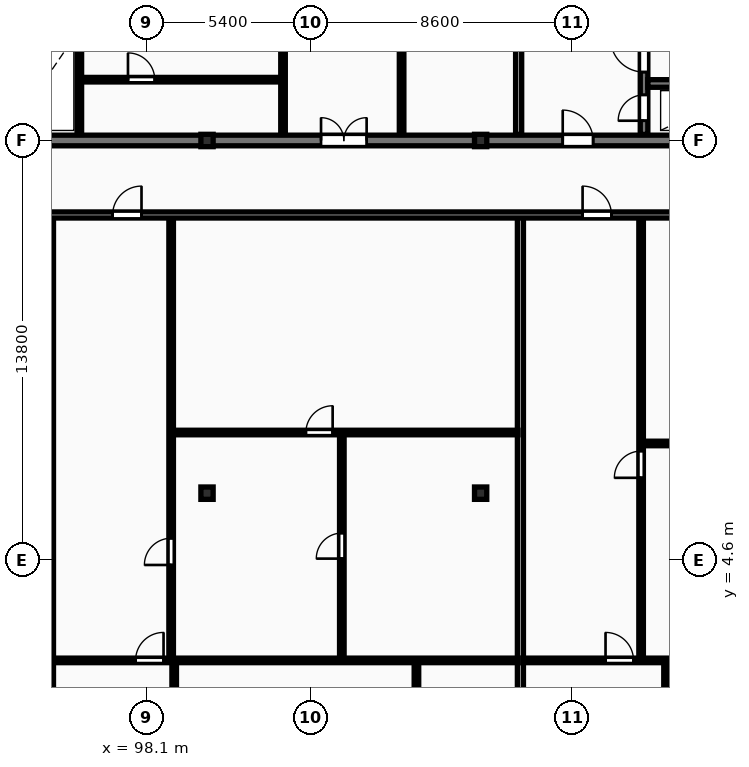
"""IFC4 building model, lengths in metres.
Left out: names, types, materials, properties, quantities, classifications, styles, units other than length and angle.
Written with IfcOpenShell. Run it as: python <this file> out.ifc"""

import sys

from ifc_helpers import new_model, si_unit, direction, frame, frame_2d, origin, origin_2d, place, context, subcontext, project, spatial, rectangle, i_section, extrude, element, fill, save


model = new_model("IFC4")
c1 = context("Model", 3, precision=1e-05, world=origin(), true_north=direction((0.0, 1.0)))
c2 = subcontext(c1, "Body", "Model", "MODEL_VIEW")
j1 = project(units=[si_unit("LENGTHUNIT", "METRE"), si_unit("PLANEANGLEUNIT", "RADIAN")], contexts=[c1])
p1 = place(None, origin())
s1 = spatial("IfcSite", under=j1, at=p1, CompositionType="ELEMENT")
p2 = place(p1, origin())
s2 = spatial("IfcBuilding", under=s1, at=p2, CompositionType="ELEMENT")
p3 = place(p2, frame((0.0, 0.0, 139.3)))
s3 = spatial("IfcBuildingStorey", under=s2, at=p3, CompositionType="ELEMENT", Elevation=139.3)
for number, where, z_axis, x_axis in (
    (1, (100.1, 6.8, 0.0), (0.0, 0.0, 1.0), (1.0, 0.0, 0.0)),
    (2, (100.1, 18.4, 0.0), (0.0, 0.0, 1.0), (1.0, 0.0, 0.0)),
    (3, (109.1, 6.8, 0.0), (0.0, 0.0, 1.0), (1.0, 0.0, 0.0)),
    (4, (109.1, 18.4, 0.0), (0.0, 0.0, 1.0), (1.0, 0.0, 0.0)),
):
    element("IfcColumn", number, at=place(p3, frame(where, z_axis=z_axis, x_axis=x_axis)), inside=s3, PredefinedType="COLUMN", context=c2, shape_type="SweptSolid", body=[
        extrude(i_section(OverallWidth=0.403, OverallDepth=0.406, WebThickness=0.027, FlangeThickness=0.043, FilletRadius=0.015, at=origin_2d()), origin(), (0.0, 0.0, 1.0), 3.6),
    ])
p4 = place(p3, frame((81.925, 18.4, 0.0), z_axis=(0.0, 0.0, 1.0), x_axis=(1.0, 0.0, 0.0)))
e5 = element("IfcWall", 5, at=p4, inside=s3, PredefinedType="SHEAR", context=c2, shape_type="SweptSolid", body=[
    extrude(rectangle(XDim=36.265, YDim=0.35, at=frame_2d((18.132, 0.0))), origin(), (0.0, 0.0, 1.0), 3.6),
])
p5 = place(p4, frame((5.675, 0.0, 0.0)))
e6 = element("IfcOpeningElement", 6, at=p5, cuts=e5, PredefinedType="OPENING", context=c2, shape_type="SweptSolid", body=[
    extrude(rectangle(XDim=1.0, YDim=2.15, at=frame_2d((0.5, 1.075))), frame((0.0, 0.185, 0.0), z_axis=(0.0, -1.0, 0.0), x_axis=(1.0, 0.0, 0.0)), (0.0, 0.0, 1.0), 0.37),
])
p6 = place(p4, frame((21.925, 0.0, 0.0)))
e7 = element("IfcOpeningElement", 7, at=p6, cuts=e5, PredefinedType="OPENING", context=c2, shape_type="SweptSolid", body=[
    extrude(rectangle(XDim=1.5, YDim=2.2, at=frame_2d((0.75, 1.1))), frame((0.0, 0.185, 0.0), z_axis=(0.0, -1.0, 0.0), x_axis=(1.0, 0.0, 0.0)), (0.0, 0.0, 1.0), 0.37),
])
p7 = place(p4, frame((29.875, 0.0, 0.0)))
e8 = element("IfcOpeningElement", 8, at=p7, cuts=e5, PredefinedType="OPENING", context=c2, shape_type="SweptSolid", body=[
    extrude(rectangle(XDim=1.0, YDim=2.15, at=frame_2d((0.5, 1.075))), frame((0.0, 0.185, 0.0), z_axis=(0.0, -1.0, 0.0), x_axis=(1.0, 0.0, 0.0)), (0.0, 0.0, 1.0), 0.37),
])
p8 = place(p3, frame((95.9, 18.6, 0.0), z_axis=(0.0, 0.0, 1.0), x_axis=(0.0, 1.0, 0.0)))
e9 = element("IfcWall", 9, at=p8, inside=s3, PredefinedType="PARTITIONING", context=c2, shape_type="SweptSolid", body=[
    extrude(rectangle(XDim=3.6, YDim=0.15, at=frame_2d((1.8, 0.0))), origin(), (0.0, 0.0, 1.0), 3.31),
])
p9 = place(p3, frame((95.9, 20.4, 0.0), z_axis=(0.0, 0.0, 1.0), x_axis=(1.0, 0.0, 0.0)))
e10 = element("IfcWall", 10, at=p9, inside=s3, PredefinedType="PARTITIONING", context=c2, shape_type="SweptSolid", body=[
    extrude(rectangle(XDim=6.7, YDim=0.15, at=frame_2d((3.35, 0.0))), origin(), (0.0, 0.0, 1.0), 3.31),
])
p10 = place(p9, frame((1.6, 0.0, 0.0)))
e11 = element("IfcOpeningElement", 11, at=p10, cuts=e10, PredefinedType="OPENING", context=c2, shape_type="SweptSolid", body=[
    extrude(rectangle(XDim=0.88, YDim=2.06, at=frame_2d((0.44, 1.03))), frame((0.0, 0.085, 0.0), z_axis=(0.0, -1.0, 0.0), x_axis=(1.0, 0.0, 0.0)), (0.0, 0.0, 1.0), 0.17),
])
for number, where, z_axis, x_axis in (
    (12, (102.6, 18.6, 0.0), (0.0, 0.0, 1.0), (0.0, 1.0, 0.0)),
    (13, (106.5, 18.6, 0.0), (0.0, 0.0, 1.0), (0.0, 1.0, 0.0)),
):
    element("IfcWall", number, at=place(p3, frame(where, z_axis=z_axis, x_axis=x_axis)), inside=s3, PredefinedType="PARTITIONING", context=c2, shape_type="SweptSolid", body=[
        extrude(rectangle(XDim=3.6, YDim=0.15, at=frame_2d((1.8, 0.0))), origin(), (0.0, 0.0, 1.0), 3.31),
    ])
p11 = place(p3, frame((110.35, 18.6, 0.0), z_axis=(0.0, 0.0, 1.0), x_axis=(0.0, 1.0, 0.0)))
e14 = element("IfcWall", 14, at=p11, inside=s3, PredefinedType="PARTITIONING", context=c2, shape_type="SweptSolid", body=[
    extrude(rectangle(XDim=11.6, YDim=0.2, at=frame_2d((5.8, 0.0))), origin(), (0.0, 0.0, 1.0), 3.31),
])
p12 = place(p11, frame((5.2, 0.0, 0.0)))
e15 = element("IfcOpeningElement", 15, at=p12, cuts=e14, PredefinedType="OPENING", context=c2, shape_type="SweptSolid", body=[
    extrude(rectangle(XDim=1.1, YDim=2.15, at=frame_2d((0.55, 1.075))), frame((0.0, 0.11, 0.0), z_axis=(0.0, -1.0, 0.0), x_axis=(1.0, 0.0, 0.0)), (0.0, 0.0, 1.0), 0.22),
])
p13 = place(p3, frame((114.475, 18.6, 0.0), z_axis=(0.0, 0.0, 1.0), x_axis=(0.0, 1.0, 0.0)))
e16 = element("IfcWall", 16, at=p13, inside=s3, PredefinedType="SHEAR", context=c2, shape_type="SweptSolid", body=[
    extrude(rectangle(XDim=11.6, YDim=0.25, at=frame_2d((5.8, 0.0))), origin(), (0.0, 0.0, 1.0), 3.6),
])
p14 = place(p13, frame((0.45, 0.0, 0.0)))
e17 = element("IfcOpeningElement", 17, at=p14, cuts=e16, PredefinedType="OPENING", context=c2, shape_type="SweptSolid", body=[
    extrude(rectangle(XDim=0.85, YDim=2.05, at=frame_2d((0.425, 1.025))), frame((0.0, 0.135, 0.0), z_axis=(0.0, -1.0, 0.0), x_axis=(1.0, 0.0, 0.0)), (0.0, 0.0, 1.0), 0.27),
])
p15 = place(p13, frame((2.05, 0.0, 0.0)))
e18 = element("IfcOpeningElement", 18, at=p15, cuts=e16, PredefinedType="OPENING", context=c2, shape_type="SweptSolid", body=[
    extrude(rectangle(XDim=1.1, YDim=2.1, at=frame_2d((0.55, 1.05))), frame((0.0, 0.135, 0.0), z_axis=(0.0, -1.0, 0.0), x_axis=(1.0, 0.0, 0.0)), (0.0, 0.0, 1.0), 0.27),
])
p16 = place(p13, frame((9.95, 0.0, 0.0)))
e19 = element("IfcOpeningElement", 19, at=p16, cuts=e16, PredefinedType="OPENING", context=c2, shape_type="SweptSolid", body=[
    extrude(rectangle(XDim=0.85, YDim=2.05, at=frame_2d((0.425, 1.025))), frame((0.0, 0.135, 0.0), z_axis=(0.0, -1.0, 0.0), x_axis=(1.0, 0.0, 0.0)), (0.0, 0.0, 1.0), 0.27),
])
p17 = place(p3, frame((114.6, 20.275, 0.0), z_axis=(0.0, 0.0, 1.0), x_axis=(1.0, 0.0, 0.0)))
e20 = element("IfcWall", 20, at=p17, inside=s3, PredefinedType="SHEAR", context=c2, shape_type="SweptSolid", body=[
    extrude(rectangle(XDim=3.24, YDim=0.25, at=frame_2d((1.62, 0.0))), origin(), (0.0, 0.0, 1.0), 3.6),
])
for number, where, z_axis, x_axis in (
    (21, (94.95, -8.7, 0.0), (0.0, 0.0, 1.0), (0.0, 1.0, 0.0)),
    (22, (110.408, -8.7, 0.0), (0.0, 0.0, 1.0), (0.0, 1.0, 0.0)),
):
    element("IfcWall", number, at=place(p3, frame(where, z_axis=z_axis, x_axis=x_axis)), inside=s3, PredefinedType="PARTITIONING", context=c2, shape_type="SweptSolid", body=[
        extrude(rectangle(XDim=24.57, YDim=0.2, at=frame_2d((12.285, 0.0))), origin(), (0.0, 0.0, 1.0), 3.31),
    ])
p18 = place(p3, frame((104.534, 1.34, 0.0), z_axis=(0.0, 0.0, 1.0), x_axis=(0.0, 1.0, 0.0)))
e23 = element("IfcWall", 23, at=p18, inside=s3, PredefinedType="PARTITIONING", context=c2, shape_type="SweptSolid", body=[
    extrude(rectangle(XDim=7.455, YDim=0.15, at=frame_2d((3.728, 0.0))), origin(), (0.0, 0.0, 1.0), 3.31),
])
p19 = place(p18, frame((3.308, 0.0, 0.0)))
e24 = element("IfcOpeningElement", 24, at=p19, cuts=e23, PredefinedType="OPENING", context=c2, shape_type="SweptSolid", body=[
    extrude(rectangle(XDim=0.84, YDim=2.04, at=frame_2d((0.42, 1.02))), frame((0.0, 0.085, 0.0), z_axis=(0.0, -1.0, 0.0), x_axis=(1.0, 0.0, 0.0)), (0.0, 0.0, 1.0), 0.17),
])
p20 = place(p3, frame((98.98, 8.795, 0.0), z_axis=(0.0, 0.0, 1.0), x_axis=(1.0, 0.0, 0.0)))
e25 = element("IfcWall", 25, at=p20, inside=s3, PredefinedType="PARTITIONING", context=c2, shape_type="SweptSolid", body=[
    extrude(rectangle(XDim=11.348, YDim=0.15, at=frame_2d((5.674, 0.0))), origin(), (0.0, 0.0, 1.0), 3.31),
])
p21 = place(p20, frame((4.372, 0.0, 0.0)))
e26 = element("IfcOpeningElement", 26, at=p21, cuts=e25, PredefinedType="OPENING", context=c2, shape_type="SweptSolid", body=[
    extrude(rectangle(XDim=0.88, YDim=2.06, at=frame_2d((0.44, 1.03))), frame((0.0, 0.085, 0.0), z_axis=(0.0, -1.0, 0.0), x_axis=(1.0, 0.0, 0.0)), (0.0, 0.0, 1.0), 0.17),
])
p22 = place(p3, frame((98.92, 1.34, 0.0), z_axis=(0.0, 0.0, 1.0), x_axis=(0.0, 1.0, 0.0)))
e27 = element("IfcWall", 27, at=p22, inside=s3, PredefinedType="PARTITIONING", context=c2, shape_type="SweptSolid", body=[
    extrude(rectangle(XDim=14.55, YDim=0.15, at=frame_2d((7.275, 0.0))), origin(), (0.0, 0.0, 1.0), 3.31),
])
p23 = place(p22, frame((3.098, 0.0, 0.0)))
e28 = element("IfcOpeningElement", 28, at=p23, cuts=e27, PredefinedType="OPENING", context=c2, shape_type="SweptSolid", body=[
    extrude(rectangle(XDim=0.88, YDim=2.06, at=frame_2d((0.44, 1.03))), frame((0.0, 0.085, 0.0), z_axis=(0.0, -1.0, 0.0), x_axis=(1.0, 0.0, 0.0)), (0.0, 0.0, 1.0), 0.17),
])
p24 = place(p3, frame((99.02, -3.74, 0.0), z_axis=(0.0, 0.0, 1.0), x_axis=(0.0, 1.0, 0.0)))
e29 = element("IfcWall", 29, at=p24, inside=s3, PredefinedType="PARTITIONING", context=c2, shape_type="SweptSolid", body=[
    extrude(rectangle(XDim=5.0, YDim=0.15, at=frame_2d((2.5, 0.0))), origin(), (0.0, 0.0, 1.0), 3.31),
])
p25 = place(p24, frame((2.06, 0.0, 0.0)))
e30 = element("IfcOpeningElement", 30, at=p25, cuts=e29, PredefinedType="OPENING", context=c2, shape_type="SweptSolid", body=[
    extrude(rectangle(XDim=0.88, YDim=2.06, at=frame_2d((0.44, 1.03))), frame((0.0, 0.085, 0.0), z_axis=(0.0, -1.0, 0.0), x_axis=(1.0, 0.0, 0.0)), (0.0, 0.0, 1.0), 0.17),
])
p26 = place(p3, frame((106.988, -8.7, 0.0), z_axis=(0.0, 0.0, 1.0), x_axis=(0.0, 1.0, 0.0)))
e31 = element("IfcWall", 31, at=p26, inside=s3, PredefinedType="PARTITIONING", context=c2, shape_type="SweptSolid", body=[
    extrude(rectangle(XDim=9.96, YDim=0.15, at=frame_2d((4.98, 0.0))), origin(), (0.0, 0.0, 1.0), 3.31),
])
p27 = place(p26, frame((5.894, 0.0, 0.0)))
e32 = element("IfcOpeningElement", 32, at=p27, cuts=e31, PredefinedType="OPENING", context=c2, shape_type="SweptSolid", body=[
    extrude(rectangle(XDim=0.84, YDim=2.04, at=frame_2d((0.42, 1.02))), frame((0.0, 0.085, 0.0), z_axis=(0.0, -1.0, 0.0), x_axis=(1.0, 0.0, 0.0)), (0.0, 0.0, 1.0), 0.17),
])
p28 = place(p26, frame((7.69, 0.0, 0.0)))
e33 = element("IfcOpeningElement", 33, at=p28, cuts=e31, PredefinedType="OPENING", context=c2, shape_type="SweptSolid", body=[
    extrude(rectangle(XDim=0.84, YDim=2.04, at=frame_2d((0.42, 1.02))), frame((0.0, 0.085, 0.0), z_axis=(0.0, -1.0, 0.0), x_axis=(1.0, 0.0, 0.0)), (0.0, 0.0, 1.0), 0.17),
])
p29 = place(p26, frame((2.223, 0.0, 0.0)))
e34 = element("IfcOpeningElement", 34, at=p29, cuts=e31, PredefinedType="OPENING", context=c2, shape_type="SweptSolid", body=[
    extrude(rectangle(XDim=0.88, YDim=2.06, at=frame_2d((0.44, 1.03))), frame((0.0, 0.085, 0.0), z_axis=(0.0, -1.0, 0.0), x_axis=(1.0, 0.0, 0.0)), (0.0, 0.0, 1.0), 0.17),
])
p30 = place(p3, frame((95.03, 1.3, 0.0), z_axis=(0.0, 0.0, 1.0), x_axis=(1.0, 0.0, 0.0)))
e35 = element("IfcWall", 35, at=p30, inside=s3, PredefinedType="PARTITIONING", context=c2, shape_type="SweptSolid", body=[
    extrude(rectangle(XDim=15.298, YDim=0.15, at=frame_2d((7.649, 0.0))), origin(), (0.0, 0.0, 1.0), 3.31),
])
p31 = place(p30, frame((2.72, 0.0, 0.0)))
e36 = element("IfcOpeningElement", 36, at=p31, cuts=e35, PredefinedType="OPENING", context=c2, shape_type="SweptSolid", body=[
    extrude(rectangle(XDim=0.92, YDim=2.08, at=frame_2d((0.46, 1.04))), frame((0.0, 0.085, 0.0), z_axis=(0.0, -1.0, 0.0), x_axis=(1.0, 0.0, 0.0)), (0.0, 0.0, 1.0), 0.17),
])
p32 = place(p3, frame((114.438, 8.435, 0.0), z_axis=(0.0, 0.0, 1.0), x_axis=(1.0, 0.0, 0.0)))
e37 = element("IfcWall", 37, at=p32, inside=s3, PredefinedType="PARTITIONING", context=c2, shape_type="SweptSolid", body=[
    extrude(rectangle(XDim=16.182, YDim=0.15, at=frame_2d((8.091, 0.0))), origin(), (0.0, 0.0, 1.0), 3.31),
])
p33 = place(p32, frame((6.821, 0.0, 0.0)))
e38 = element("IfcOpeningElement", 38, at=p33, cuts=e37, PredefinedType="OPENING", context=c2, shape_type="SweptSolid", body=[
    extrude(rectangle(XDim=0.88, YDim=2.06, at=frame_2d((0.44, 1.03))), frame((0.0, 0.085, 0.0), z_axis=(0.0, -1.0, 0.0), x_axis=(1.0, 0.0, 0.0)), (0.0, 0.0, 1.0), 0.17),
])
p34 = place(p3, frame((114.378, 1.34, 0.0), z_axis=(0.0, 0.0, 1.0), x_axis=(0.0, 1.0, 0.0)))
e39 = element("IfcWall", 39, at=p34, inside=s3, PredefinedType="PARTITIONING", context=c2, shape_type="SweptSolid", body=[
    extrude(rectangle(XDim=14.55, YDim=0.15, at=frame_2d((7.275, 0.0))), origin(), (0.0, 0.0, 1.0), 3.31),
])
p35 = place(p34, frame((5.965, 0.0, 0.0)))
e40 = element("IfcOpeningElement", 40, at=p35, cuts=e39, PredefinedType="OPENING", context=c2, shape_type="SweptSolid", body=[
    extrude(rectangle(XDim=0.88, YDim=2.06, at=frame_2d((0.44, 1.03))), frame((0.0, 0.085, 0.0), z_axis=(0.0, -1.0, 0.0), x_axis=(1.0, 0.0, 0.0)), (0.0, 0.0, 1.0), 0.17),
])
p36 = place(p3, frame((115.198, -8.7, 0.0), z_axis=(0.0, 0.0, 1.0), x_axis=(0.0, 1.0, 0.0)))
e41 = element("IfcWall", 41, at=p36, inside=s3, PredefinedType="PARTITIONING", context=c2, shape_type="SweptSolid", body=[
    extrude(rectangle(XDim=9.96, YDim=0.15, at=frame_2d((4.98, 0.0))), origin(), (0.0, 0.0, 1.0), 3.31),
])
p37 = place(p36, frame((5.22, 0.0, 0.0)))
e42 = element("IfcOpeningElement", 42, at=p37, cuts=e41, PredefinedType="OPENING", context=c2, shape_type="SweptSolid", body=[
    extrude(rectangle(XDim=0.92, YDim=2.08, at=frame_2d((0.46, 1.04))), frame((0.0, 0.085, 0.0), z_axis=(0.0, -1.0, 0.0), x_axis=(1.0, 0.0, 0.0)), (0.0, 0.0, 1.0), 0.17),
])
p38 = place(p3, frame((110.488, 1.3, 0.0), z_axis=(0.0, 0.0, 1.0), x_axis=(1.0, 0.0, 0.0)))
e43 = element("IfcWall", 43, at=p38, inside=s3, PredefinedType="PARTITIONING", context=c2, shape_type="SweptSolid", body=[
    extrude(rectangle(XDim=20.132, YDim=0.15, at=frame_2d((10.066, 0.0))), origin(), (0.0, 0.0, 1.0), 3.31),
])
p39 = place(p38, frame((2.72, 0.0, 0.0)))
e44 = element("IfcOpeningElement", 44, at=p39, cuts=e43, PredefinedType="OPENING", context=c2, shape_type="SweptSolid", body=[
    extrude(rectangle(XDim=0.92, YDim=2.08, at=frame_2d((0.46, 1.04))), frame((0.0, 0.085, 0.0), z_axis=(0.0, -1.0, 0.0), x_axis=(1.0, 0.0, 0.0)), (0.0, 0.0, 1.0), 0.17),
])
p40 = place(p3, frame((72.7, 15.95, 0.0), z_axis=(0.0, 0.0, 1.0), x_axis=(1.0, 0.0, 0.0)))
e45 = element("IfcWall", 45, at=p40, inside=s3, PredefinedType="PARTITIONING", context=c2, shape_type="SweptSolid", body=[
    extrude(rectangle(XDim=58.0, YDim=0.2, at=frame_2d((29.0, 0.0))), origin(), (0.0, 0.0, 1.0), 3.31),
])
p41 = place(p40, frame((2.045, 0.0, 0.0)))
e46 = element("IfcOpeningElement", 46, at=p41, cuts=e45, PredefinedType="OPENING", context=c2, shape_type="SweptSolid", body=[
    extrude(rectangle(XDim=0.95, YDim=2.15, at=frame_2d((0.475, 1.075))), frame((0.0, 0.11, 0.0), z_axis=(0.0, -1.0, 0.0), x_axis=(1.0, 0.0, 0.0)), (0.0, 0.0, 1.0), 0.22),
])
p42 = place(p40, frame((24.295, 0.0, 0.0)))
e47 = element("IfcOpeningElement", 47, at=p42, cuts=e45, PredefinedType="OPENING", context=c2, shape_type="SweptSolid", body=[
    extrude(rectangle(XDim=0.95, YDim=2.15, at=frame_2d((0.475, 1.075))), frame((0.0, 0.11, 0.0), z_axis=(0.0, -1.0, 0.0), x_axis=(1.0, 0.0, 0.0)), (0.0, 0.0, 1.0), 0.22),
])
p43 = place(p40, frame((39.753, 0.0, 0.0)))
e48 = element("IfcOpeningElement", 48, at=p43, cuts=e45, PredefinedType="OPENING", context=c2, shape_type="SweptSolid", body=[
    extrude(rectangle(XDim=0.95, YDim=2.15, at=frame_2d((0.475, 1.075))), frame((0.0, 0.11, 0.0), z_axis=(0.0, -1.0, 0.0), x_axis=(1.0, 0.0, 0.0)), (0.0, 0.0, 1.0), 0.22),
])
p44 = place(p6, origin())
e49 = element("IfcDoor", 49, at=p44, inside=s3, OperationType="DOUBLE_DOOR_SINGLE_SWING", PredefinedType="DOOR", context=c2, shape_type="SweptSolid", body=[
    extrude(rectangle(XDim=1.5, YDim=2.2, at=frame_2d((0.75, 1.1))), frame((0.0, 0.025, 0.0), z_axis=(0.0, -1.0, 0.0), x_axis=(1.0, 0.0, 0.0)), (0.0, 0.0, 1.0), 0.05),
])
fill(e7, e49)
p45 = place(p7, origin())
e50 = element("IfcDoor", 50, at=p45, inside=s3, OperationType="SINGLE_SWING_LEFT", PredefinedType="DOOR", context=c2, shape_type="SweptSolid", body=[
    extrude(rectangle(XDim=1.0, YDim=2.15, at=frame_2d((0.5, 1.075))), frame((0.0, 0.025, 0.0), z_axis=(0.0, -1.0, 0.0), x_axis=(1.0, 0.0, 0.0)), (0.0, 0.0, 1.0), 0.05),
])
fill(e8, e50)
p46 = place(p10, origin())
e51 = element("IfcDoor", 51, at=p46, inside=s3, OperationType="SINGLE_SWING_LEFT", PredefinedType="DOOR", context=c2, shape_type="SweptSolid", body=[
    extrude(rectangle(XDim=0.88, YDim=2.06, at=frame_2d((0.44, 1.03))), frame((0.0, 0.025, 0.0), z_axis=(0.0, -1.0, 0.0), x_axis=(1.0, 0.0, 0.0)), (0.0, 0.0, 1.0), 0.05),
])
fill(e11, e51)
p47 = place(p14, origin())
e52 = element("IfcDoor", 52, at=p47, inside=s3, OperationType="SINGLE_SWING_LEFT", PredefinedType="DOOR", context=c2, shape_type="SweptSolid", body=[
    extrude(rectangle(XDim=0.85, YDim=2.05, at=frame_2d((0.425, 1.025))), frame((0.0, 0.025, 0.0), z_axis=(0.0, -1.0, 0.0), x_axis=(1.0, 0.0, 0.0)), (0.0, 0.0, 1.0), 0.05),
])
fill(e17, e52)
p48 = place(p15, origin())
e53 = element("IfcDoor", 53, at=p48, inside=s3, OperationType="SINGLE_SWING_RIGHT", PredefinedType="DOOR", context=c2, shape_type="SweptSolid", body=[
    extrude(rectangle(XDim=1.1, YDim=2.1, at=frame_2d((0.55, 1.05))), frame((0.0, 0.025, 0.0), z_axis=(0.0, -1.0, 0.0), x_axis=(1.0, 0.0, 0.0)), (0.0, 0.0, 1.0), 0.05),
])
fill(e18, e53)
p49 = place(p19, origin())
e54 = element("IfcDoor", 54, at=p49, inside=s3, OperationType="SINGLE_SWING_LEFT", PredefinedType="DOOR", context=c2, shape_type="SweptSolid", body=[
    extrude(rectangle(XDim=0.84, YDim=2.04, at=frame_2d((0.42, 1.02))), frame((0.0, 0.025, 0.0), z_axis=(0.0, -1.0, 0.0), x_axis=(1.0, 0.0, 0.0)), (0.0, 0.0, 1.0), 0.05),
])
fill(e24, e54)
p50 = place(p21, origin())
e55 = element("IfcDoor", 55, at=p50, inside=s3, OperationType="SINGLE_SWING_RIGHT", PredefinedType="DOOR", context=c2, shape_type="SweptSolid", body=[
    extrude(rectangle(XDim=0.88, YDim=2.06, at=frame_2d((0.44, 1.03))), frame((0.0, 0.025, 0.0), z_axis=(0.0, -1.0, 0.0), x_axis=(1.0, 0.0, 0.0)), (0.0, 0.0, 1.0), 0.05),
])
fill(e26, e55)
p51 = place(p23, origin())
e56 = element("IfcDoor", 56, at=p51, inside=s3, OperationType="SINGLE_SWING_LEFT", PredefinedType="DOOR", context=c2, shape_type="SweptSolid", body=[
    extrude(rectangle(XDim=0.88, YDim=2.06, at=frame_2d((0.44, 1.03))), frame((0.0, 0.025, 0.0), z_axis=(0.0, -1.0, 0.0), x_axis=(1.0, 0.0, 0.0)), (0.0, 0.0, 1.0), 0.05),
])
fill(e28, e56)
p52 = place(p31, origin())
e57 = element("IfcDoor", 57, at=p52, inside=s3, OperationType="SINGLE_SWING_RIGHT", PredefinedType="DOOR", context=c2, shape_type="SweptSolid", body=[
    extrude(rectangle(XDim=0.92, YDim=2.08, at=frame_2d((0.46, 1.04))), frame((0.0, 0.025, 0.0), z_axis=(0.0, -1.0, 0.0), x_axis=(1.0, 0.0, 0.0)), (0.0, 0.0, 1.0), 0.05),
])
fill(e36, e57)
p53 = place(p35, origin())
e58 = element("IfcDoor", 58, at=p53, inside=s3, OperationType="SINGLE_SWING_LEFT", PredefinedType="DOOR", context=c2, shape_type="SweptSolid", body=[
    extrude(rectangle(XDim=0.88, YDim=2.06, at=frame_2d((0.44, 1.03))), frame((0.0, 0.025, 0.0), z_axis=(0.0, -1.0, 0.0), x_axis=(1.0, 0.0, 0.0)), (0.0, 0.0, 1.0), 0.05),
])
fill(e40, e58)
p54 = place(p39, origin())
e59 = element("IfcDoor", 59, at=p54, inside=s3, OperationType="SINGLE_SWING_LEFT", PredefinedType="DOOR", context=c2, shape_type="SweptSolid", body=[
    extrude(rectangle(XDim=0.92, YDim=2.08, at=frame_2d((0.46, 1.04))), frame((0.0, 0.025, 0.0), z_axis=(0.0, -1.0, 0.0), x_axis=(1.0, 0.0, 0.0)), (0.0, 0.0, 1.0), 0.05),
])
fill(e44, e59)
p55 = place(p42, origin())
e60 = element("IfcDoor", 60, at=p55, inside=s3, OperationType="SINGLE_SWING_RIGHT", PredefinedType="DOOR", context=c2, shape_type="SweptSolid", body=[
    extrude(rectangle(XDim=0.95, YDim=2.15, at=frame_2d((0.475, 1.075))), frame((0.0, 0.025, 0.0), z_axis=(0.0, -1.0, 0.0), x_axis=(1.0, 0.0, 0.0)), (0.0, 0.0, 1.0), 0.05),
])
fill(e47, e60)
p56 = place(p43, origin())
e61 = element("IfcDoor", 61, at=p56, inside=s3, OperationType="SINGLE_SWING_LEFT", PredefinedType="DOOR", context=c2, shape_type="SweptSolid", body=[
    extrude(rectangle(XDim=0.95, YDim=2.15, at=frame_2d((0.475, 1.075))), frame((0.0, 0.025, 0.0), z_axis=(0.0, -1.0, 0.0), x_axis=(1.0, 0.0, 0.0)), (0.0, 0.0, 1.0), 0.05),
])
fill(e48, e61)
save(model, sys.argv[1])
